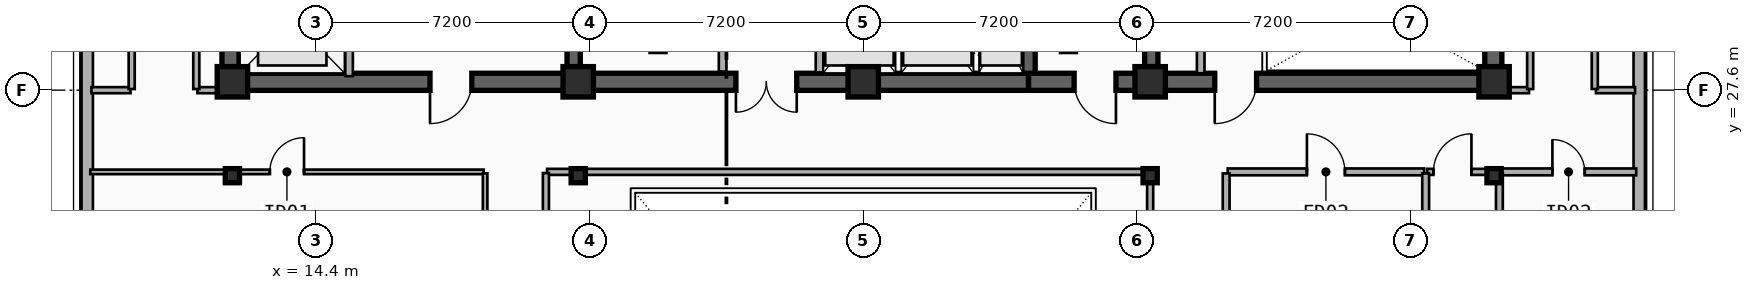
"""IFC4 building model, lengths in metres.
Left out: names, types, materials, properties, quantities, classifications, styles, units other than length and angle.
Written with IfcOpenShell. Run it as: python <this file> out.ifc"""

import sys

from ifc_helpers import new_model, si_unit, direction, frame, frame_2d, origin, origin_2d, place, context, subcontext, project, spatial, rectangle, i_section, extrude, element, fill, save


model = new_model("IFC4")
c1 = context("Model", 3, precision=1e-05, world=origin(), true_north=direction((0.0, 1.0)))
c2 = subcontext(c1, "Body", "Model", "MODEL_VIEW")
j1 = project(units=[si_unit("LENGTHUNIT", "METRE"), si_unit("PLANEANGLEUNIT", "RADIAN")], contexts=[c1])
p1 = place(None, origin())
s1 = spatial("IfcSite", under=j1, at=p1, CompositionType="ELEMENT")
p2 = place(p1, origin())
s2 = spatial("IfcBuilding", under=s1, at=p2, CompositionType="ELEMENT")
p3 = place(p2, frame((0.0, 0.0, 276.9)))
s3 = spatial("IfcBuildingStorey", under=s2, at=p3, CompositionType="ELEMENT", Elevation=276.9)
p4 = place(p3, frame((21.18, 27.82, 0.0), z_axis=(0.0, 0.0, 1.0), x_axis=(-1.0, 0.0, 0.0)))
e1 = element("IfcWall", 1, at=p4, inside=s3, PredefinedType="SHEAR", context=c2, shape_type="SweptSolid", body=[
    extrude(rectangle(XDim=9.03, YDim=0.45, at=frame_2d((4.515, 0.0))), origin(), (0.0, 0.0, 1.0), 3.7),
])
p5 = place(p4, frame((2.68, 0.0, 0.0)))
e2 = element("IfcOpeningElement", 2, at=p5, cuts=e1, PredefinedType="OPENING", context=c2, shape_type="SweptSolid", body=[
    extrude(rectangle(XDim=1.1, YDim=2.15, at=frame_2d((0.55, 1.075))), frame((0.0, 0.235, 0.0), z_axis=(0.0, -1.0, 0.0), x_axis=(1.0, 0.0, 0.0)), (0.0, 0.0, 1.0), 0.47),
])
p6 = place(p3, frame((33.15, 27.82, 0.0), z_axis=(0.0, 0.0, 1.0), x_axis=(-1.0, 0.0, 0.0)))
e3 = element("IfcWall", 3, at=p6, inside=s3, PredefinedType="SHEAR", context=c2, shape_type="SweptSolid", body=[
    extrude(rectangle(XDim=11.97, YDim=0.45, at=frame_2d((5.985, 0.0))), origin(), (0.0, 0.0, 1.0), 3.7),
])
p7 = place(p6, frame((6.1, 0.0, 0.0)))
e4 = element("IfcOpeningElement", 4, at=p7, cuts=e3, PredefinedType="OPENING", context=c2, shape_type="SweptSolid", body=[
    extrude(rectangle(XDim=1.6, YDim=2.2, at=frame_2d((0.8, 1.1))), frame((0.0, 0.235, 0.0), z_axis=(0.0, -1.0, 0.0), x_axis=(1.0, 0.0, 0.0)), (0.0, 0.0, 1.0), 0.47),
])
p8 = place(p3, frame((45.38, 27.82, 0.0), z_axis=(0.0, 0.0, 1.0), x_axis=(-1.0, 0.0, 0.0)))
e5 = element("IfcWall", 5, at=p8, inside=s3, PredefinedType="SHEAR", context=c2, shape_type="SweptSolid", body=[
    extrude(rectangle(XDim=12.23, YDim=0.45, at=frame_2d((6.115, 0.0))), origin(), (0.0, 0.0, 1.0), 3.7),
])
p9 = place(p8, frame((9.93, 0.0, 0.0)))
e6 = element("IfcOpeningElement", 6, at=p9, cuts=e5, PredefinedType="OPENING", context=c2, shape_type="SweptSolid", body=[
    extrude(rectangle(XDim=1.1, YDim=2.15, at=frame_2d((0.55, 1.075))), frame((0.0, 0.235, 0.0), z_axis=(0.0, -1.0, 0.0), x_axis=(1.0, 0.0, 0.0)), (0.0, 0.0, 1.0), 0.47),
])
p10 = place(p8, frame((6.23, 0.0, 0.0)))
e7 = element("IfcOpeningElement", 7, at=p10, cuts=e5, PredefinedType="OPENING", context=c2, shape_type="SweptSolid", body=[
    extrude(rectangle(XDim=1.1, YDim=2.15, at=frame_2d((0.55, 1.075))), frame((0.0, 0.235, 0.0), z_axis=(0.0, -1.0, 0.0), x_axis=(1.0, 0.0, 0.0)), (0.0, 0.0, 1.0), 0.47),
])
for number, where, z_axis, x_axis in (
    (8, (12.15, 28.045, 0.0), (0.0, 0.0, 1.0), (0.0, 1.0, 0.0)),
    (9, (45.38, 28.045, 0.0), (0.0, 0.0, 1.0), (0.0, 1.0, 0.0)),
):
    element("IfcWall", number, at=place(p3, frame(where, z_axis=z_axis, x_axis=x_axis)), inside=s3, PredefinedType="SHEAR", context=c2, shape_type="SweptSolid", body=[
        extrude(rectangle(XDim=8.78, YDim=0.45, at=frame_2d((4.39, 0.0))), origin(), (0.0, 0.0, 1.0), 3.7),
    ])
for number, where, z_axis, x_axis in (
    (10, (21.18, 28.045, 0.0), (0.0, 0.0, 1.0), (0.0, 1.0, 0.0)),
    (11, (33.15, 28.045, 0.0), (0.0, 0.0, 1.0), (0.0, 1.0, 0.0)),
):
    element("IfcWall", number, at=place(p3, frame(where, z_axis=z_axis, x_axis=x_axis)), inside=s3, PredefinedType="SHEAR", context=c2, shape_type="SweptSolid", body=[
        extrude(rectangle(XDim=8.78, YDim=0.35, at=frame_2d((4.39, 0.0))), origin(), (0.0, 0.0, 1.0), 3.7),
    ])
p11 = place(p3, frame((36.38, 28.045, 0.0), z_axis=(0.0, 0.0, 1.0), x_axis=(0.0, 1.0, 0.0)))
e12 = element("IfcWall", 12, at=p11, inside=s3, PredefinedType="SHEAR", context=c2, shape_type="SweptSolid", body=[
    extrude(rectangle(XDim=8.78, YDim=0.35, at=frame_2d((4.39, 0.0))), origin(), (0.0, 0.0, 1.0), 3.7),
])
p12 = place(p11, frame((3.735, 0.0, 0.0)))
e13 = element("IfcOpeningElement", 13, at=p12, cuts=e12, PredefinedType="OPENING", context=c2, shape_type="SweptSolid", body=[
    extrude(rectangle(XDim=1.1, YDim=2.15, at=frame_2d((0.55, 1.075))), frame((0.0, 0.185, 0.0), z_axis=(0.0, -1.0, 0.0), x_axis=(1.0, 0.0, 0.0)), (0.0, 0.0, 1.0), 0.37),
])
for number, where, z_axis, x_axis in (
    (14, (12.2, 27.82, 0.0), (0.0, 0.0, 1.0), (1.0, 0.0, 0.0)),
    (15, (21.3, 27.82, 0.0), (0.0, 0.0, 1.0), (1.0, 0.0, 0.0)),
    (16, (28.8, 27.82, 0.0), (0.0, 0.0, 1.0), (1.0, 0.0, 0.0)),
    (17, (36.35, 27.82, 0.0), (0.0, 0.0, 1.0), (1.0, 0.0, 0.0)),
    (18, (45.4, 27.82, 0.0), (0.0, 0.0, 1.0), (1.0, 0.0, 0.0)),
):
    element("IfcColumn", number, at=place(p3, frame(where, z_axis=z_axis, x_axis=x_axis)), inside=s3, PredefinedType="COLUMN", context=c2, shape_type="SweptSolid", body=[
        extrude(rectangle(XDim=0.8, YDim=0.8, at=origin_2d()), origin(), (0.0, 0.0, 1.0), 3.7),
    ])
for number, where, z_axis, x_axis in (
    (19, (12.2, 25.35, 0.0), (0.0, 0.0, 1.0), (1.0, 0.0, 0.0)),
    (20, (21.3, 25.35, 0.0), (0.0, 0.0, 1.0), (1.0, 0.0, 0.0)),
    (21, (36.35, 25.35, 0.0), (0.0, 0.0, 1.0), (1.0, 0.0, 0.0)),
    (22, (45.4, 25.35, 0.0), (0.0, 0.0, 1.0), (1.0, 0.0, 0.0)),
):
    element("IfcColumn", number, at=place(p3, frame(where, z_axis=z_axis, x_axis=x_axis)), inside=s3, PredefinedType="COLUMN", context=c2, shape_type="SweptSolid", body=[
        extrude(i_section(OverallWidth=0.374, OverallDepth=0.372, WebThickness=0.017, FlangeThickness=0.027, FilletRadius=0.015, at=origin_2d()), origin(), (0.0, 0.0, 1.0), 3.7),
    ])
p13 = place(p3, frame((49.22, 36.8, 0.0), z_axis=(0.0, 0.0, 1.0), x_axis=(0.0, -1.0, 0.0)))
e23 = element("IfcWall", 23, at=p13, inside=s3, PredefinedType="SOLIDWALL", context=c2, shape_type="SweptSolid", body=[
    extrude(rectangle(XDim=34.2, YDim=0.3, at=frame_2d((17.1, 0.0))), origin(), (0.0, 0.0, 1.0), 3.38),
])
p14 = place(p13, frame((21.127, 0.0, 0.75)))
e24 = element("IfcOpeningElement", 24, at=p14, cuts=e23, PredefinedType="OPENING", context=c2, shape_type="SweptSolid", body=[
    extrude(rectangle(XDim=2.1, YDim=2.1, at=frame_2d((1.05, 1.05))), frame((0.0, 0.16, 0.0), z_axis=(0.0, -1.0, 0.0), x_axis=(1.0, 0.0, 0.0)), (0.0, 0.0, 1.0), 0.32),
])
p15 = place(p13, frame((27.503, 0.0, 0.75)))
e25 = element("IfcOpeningElement", 25, at=p15, cuts=e23, PredefinedType="OPENING", context=c2, shape_type="SweptSolid", body=[
    extrude(rectangle(XDim=2.1, YDim=2.1, at=frame_2d((1.05, 1.05))), frame((0.0, 0.16, 0.0), z_axis=(0.0, -1.0, 0.0), x_axis=(1.0, 0.0, 0.0)), (0.0, 0.0, 1.0), 0.32),
])
p16 = place(p3, frame((8.38, 2.6, 0.0), z_axis=(0.0, 0.0, 1.0), x_axis=(0.0, 1.0, 0.0)))
e26 = element("IfcWall", 26, at=p16, inside=s3, PredefinedType="SOLIDWALL", context=c2, shape_type="SweptSolid", body=[
    extrude(rectangle(XDim=34.2, YDim=0.3, at=frame_2d((17.1, 0.0))), origin(), (0.0, 0.0, 1.0), 3.38),
])
p17 = place(p16, frame((6.33, 0.0, 0.75)))
e27 = element("IfcOpeningElement", 27, at=p17, cuts=e26, PredefinedType="OPENING", context=c2, shape_type="SweptSolid", body=[
    extrude(rectangle(XDim=2.1, YDim=2.1, at=frame_2d((1.05, 1.05))), frame((0.0, 0.16, 0.0), z_axis=(0.0, -1.0, 0.0), x_axis=(1.0, 0.0, 0.0)), (0.0, 0.0, 1.0), 0.32),
])
p18 = place(p16, frame((14.44, 0.0, 0.75)))
e28 = element("IfcOpeningElement", 28, at=p18, cuts=e26, PredefinedType="OPENING", context=c2, shape_type="SweptSolid", body=[
    extrude(rectangle(XDim=2.1, YDim=2.1, at=frame_2d((1.05, 1.05))), frame((0.0, 0.16, 0.0), z_axis=(0.0, -1.0, 0.0), x_axis=(1.0, 0.0, 0.0)), (0.0, 0.0, 1.0), 0.32),
])
p19 = place(p3, frame((15.27, 27.97, 0.0), z_axis=(0.0, 0.0, 1.0), x_axis=(0.0, 1.0, 0.0)))
e29 = element("IfcWall", 29, at=p19, inside=s3, PredefinedType="PARTITIONING", context=c2, shape_type="SweptSolid", body=[
    extrude(rectangle(XDim=2.96, YDim=0.2, at=frame_2d((1.48, 0.0))), origin(), (0.0, 0.0, 1.0), 2.45),
])
p20 = place(p19, frame((0.93, 0.0, 0.0)))
e30 = element("IfcOpeningElement", 30, at=p20, cuts=e29, PredefinedType="OPENING", context=c2, shape_type="SweptSolid", body=[
    extrude(rectangle(XDim=1.1, YDim=2.15, at=frame_2d((0.55, 1.075))), frame((0.0, 0.11, 0.0), z_axis=(0.0, -1.0, 0.0), x_axis=(1.0, 0.0, 0.0)), (0.0, 0.0, 1.0), 0.22),
])
p21 = place(p3, frame((27.65, 28.07, 0.0), z_axis=(0.0, 0.0, 1.0), x_axis=(0.0, 1.0, 0.0)))
e31 = element("IfcWall", 31, at=p21, inside=s3, PredefinedType="PARTITIONING", context=c2, shape_type="SweptSolid", body=[
    extrude(rectangle(XDim=2.58, YDim=0.2, at=frame_2d((1.29, 0.0))), origin(), (0.0, 0.0, 1.0), 2.45),
])
p22 = place(p3, frame((37.68, 28.045, 0.0), z_axis=(0.0, 0.0, 1.0), x_axis=(0.0, 1.0, 0.0)))
e32 = element("IfcWall", 32, at=p22, inside=s3, PredefinedType="PARTITIONING", context=c2, shape_type="SweptSolid", body=[
    extrude(rectangle(XDim=3.205, YDim=0.2, at=frame_2d((1.603, 0.0))), origin(), (0.0, 0.0, 1.0), 2.76),
])
p23 = place(p3, frame((25.1, 28.09, 0.0), z_axis=(0.0, 0.0, 1.0), x_axis=(0.0, 1.0, 0.0)))
e33 = element("IfcWall", 33, at=p23, inside=s3, PredefinedType="PARTITIONING", context=c2, shape_type="SweptSolid", body=[
    extrude(rectangle(XDim=1.82, YDim=0.2, at=frame_2d((0.91, 0.0))), origin(), (0.0, 0.0, 1.0), 2.76),
])
p24 = place(p23, frame((0.68, 0.0, 0.0)))
e34 = element("IfcOpeningElement", 34, at=p24, cuts=e33, PredefinedType="OPENING", context=c2, shape_type="SweptSolid", body=[
    extrude(rectangle(XDim=1.0, YDim=2.15, at=frame_2d((0.5, 1.075))), frame((0.0, 0.11, 0.0), z_axis=(0.0, -1.0, 0.0), x_axis=(1.0, 0.0, 0.0)), (0.0, 0.0, 1.0), 0.22),
])
p25 = place(p3, frame((8.46, 25.45, 0.0), z_axis=(0.0, 0.0, 1.0), x_axis=(1.0, 0.0, 0.0)))
e35 = element("IfcWall", 35, at=p25, inside=s3, PredefinedType="PARTITIONING", context=c2, shape_type="SweptSolid", body=[
    extrude(rectangle(XDim=10.35, YDim=0.12, at=frame_2d((5.175, 0.0))), origin(), (0.0, 0.0, 1.0), 2.66),
])
p26 = place(p25, frame((4.725, 0.0, 0.0)))
e36 = element("IfcOpeningElement", 36, at=p26, cuts=e35, PredefinedType="OPENING", context=c2, shape_type="SweptSolid", body=[
    extrude(rectangle(XDim=0.9, YDim=2.1, at=frame_2d((0.45, 1.05))), frame((0.0, 0.07, 0.0), z_axis=(0.0, -1.0, 0.0), x_axis=(1.0, 0.0, 0.0)), (0.0, 0.0, 1.0), 0.14),
])
p27 = place(p3, frame((38.39, 25.45, 0.0), z_axis=(0.0, 0.0, 1.0), x_axis=(1.0, 0.0, 0.0)))
e37 = element("IfcWall", 37, at=p27, inside=s3, PredefinedType="PLUMBINGWALL", context=c2, shape_type="SweptSolid", body=[
    extrude(rectangle(XDim=5.17, YDim=0.18, at=frame_2d((2.585, 0.0))), origin(), (0.0, 0.0, 1.0), 3.38),
])
p28 = place(p27, frame((2.085, 0.0, 0.0)))
e38 = element("IfcOpeningElement", 38, at=p28, cuts=e37, PredefinedType="OPENING", context=c2, shape_type="SweptSolid", body=[
    extrude(rectangle(XDim=1.0, YDim=2.15, at=frame_2d((0.5, 1.075))), frame((0.0, 0.1, 0.0), z_axis=(0.0, -1.0, 0.0), x_axis=(1.0, 0.0, 0.0)), (0.0, 0.0, 1.0), 0.2),
])
p29 = place(p3, frame((43.64, 25.45, 0.0), z_axis=(0.0, 0.0, 1.0), x_axis=(1.0, 0.0, 0.0)))
e39 = element("IfcWall", 39, at=p29, inside=s3, PredefinedType="PARTITIONING", context=c2, shape_type="SweptSolid", body=[
    extrude(rectangle(XDim=1.86, YDim=0.16, at=frame_2d((0.93, 0.0))), origin(), (0.0, 0.0, 1.0), 2.66),
])
p30 = place(p29, frame((0.164, 0.0, 0.0)))
e40 = element("IfcOpeningElement", 40, at=p30, cuts=e39, PredefinedType="OPENING", context=c2, shape_type="SweptSolid", body=[
    extrude(rectangle(XDim=1.0, YDim=2.15, at=frame_2d((0.5, 1.075))), frame((0.0, 0.09, 0.0), z_axis=(0.0, -1.0, 0.0), x_axis=(1.0, 0.0, 0.0)), (0.0, 0.0, 1.0), 0.18),
])
p31 = place(p3, frame((45.58, 25.45, 0.0), z_axis=(0.0, 0.0, 1.0), x_axis=(1.0, 0.0, 0.0)))
e41 = element("IfcWall", 41, at=p31, inside=s3, PredefinedType="PLUMBINGWALL", context=c2, shape_type="SweptSolid", body=[
    extrude(rectangle(XDim=3.56, YDim=0.18, at=frame_2d((1.78, 0.0))), origin(), (0.0, 0.0, 1.0), 2.66),
])
p32 = place(p31, frame((1.355, 0.0, 0.0)))
e42 = element("IfcOpeningElement", 42, at=p32, cuts=e41, PredefinedType="OPENING", context=c2, shape_type="SweptSolid", body=[
    extrude(rectangle(XDim=0.85, YDim=2.1, at=frame_2d((0.425, 1.05))), frame((0.0, 0.1, 0.0), z_axis=(0.0, -1.0, 0.0), x_axis=(1.0, 0.0, 0.0)), (0.0, 0.0, 1.0), 0.2),
])
p33 = place(p3, frame((18.85, 8.89, 0.0), z_axis=(0.0, 0.0, 1.0), x_axis=(0.0, 1.0, 0.0)))
e43 = element("IfcWall", 43, at=p33, inside=s3, PredefinedType="PARTITIONING", context=c2, shape_type="SweptSolid", body=[
    extrude(rectangle(XDim=16.52, YDim=0.12, at=frame_2d((8.26, 0.0))), origin(), (0.0, 0.0, 1.0), 2.86),
])
p34 = place(p33, frame((7.81, 0.0, 0.0)))
e44 = element("IfcOpeningElement", 44, at=p34, cuts=e43, PredefinedType="OPENING", context=c2, shape_type="SweptSolid", body=[
    extrude(rectangle(XDim=0.9, YDim=2.1, at=frame_2d((0.45, 1.05))), frame((0.0, 0.07, 0.0), z_axis=(0.0, -1.0, 0.0), x_axis=(1.0, 0.0, 0.0)), (0.0, 0.0, 1.0), 0.14),
])
p35 = place(p3, frame((38.35, 19.24, 0.0), z_axis=(0.0, 0.0, 1.0), x_axis=(0.0, 1.0, 0.0)))
e45 = element("IfcWall", 45, at=p35, inside=s3, PredefinedType="PLUMBINGWALL", context=c2, shape_type="SweptSolid", body=[
    extrude(rectangle(XDim=6.17, YDim=0.18, at=frame_2d((3.085, 0.0))), origin(), (0.0, 0.0, 1.0), 3.01),
])
p36 = place(p35, frame((2.585, 0.0, 0.0)))
e46 = element("IfcOpeningElement", 46, at=p36, cuts=e45, PredefinedType="OPENING", context=c2, shape_type="SweptSolid", body=[
    extrude(rectangle(XDim=1.0, YDim=2.15, at=frame_2d((0.5, 1.075))), frame((0.0, 0.1, 0.0), z_axis=(0.0, -1.0, 0.0), x_axis=(1.0, 0.0, 0.0)), (0.0, 0.0, 1.0), 0.2),
])
p37 = place(p3, frame((43.6, 19.24, 0.0), z_axis=(0.0, 0.0, 1.0), x_axis=(0.0, 1.0, 0.0)))
e47 = element("IfcWall", 47, at=p37, inside=s3, PredefinedType="PLUMBINGWALL", context=c2, shape_type="SweptSolid", body=[
    extrude(rectangle(XDim=6.17, YDim=0.18, at=frame_2d((3.085, 0.0))), origin(), (0.0, 0.0, 1.0), 3.01),
])
p38 = place(p3, frame((45.54, 20.29, 0.0), z_axis=(0.0, 0.0, 1.0), x_axis=(0.0, 1.0, 0.0)))
e48 = element("IfcWall", 48, at=p38, inside=s3, PredefinedType="PLUMBINGWALL", context=c2, shape_type="SweptSolid", body=[
    extrude(rectangle(XDim=5.12, YDim=0.18, at=frame_2d((2.56, 0.0))), origin(), (0.0, 0.0, 1.0), 2.66),
])
p39 = place(p3, frame((20.48, 25.45, 0.0), z_axis=(0.0, 0.0, 1.0), x_axis=(1.0, 0.0, 0.0)))
e49 = element("IfcWall", 49, at=p39, inside=s3, PredefinedType="PARTITIONING", context=c2, shape_type="SweptSolid", body=[
    extrude(rectangle(XDim=15.84, YDim=0.16, at=frame_2d((7.92, 0.0))), origin(), (0.0, 0.0, 1.0), 2.66),
])
p40 = place(p3, frame((8.49, 27.6, 0.0), z_axis=(0.0, 0.0, 1.0), x_axis=(1.0, 0.0, 0.0)))
e50 = element("IfcWall", 50, at=p40, inside=s3, PredefinedType="PARTITIONING", context=c2, shape_type="SweptSolid", body=[
    extrude(rectangle(XDim=1.03, YDim=0.16, at=frame_2d((0.515, 0.0))), origin(), (0.0, 0.0, 1.0), 3.38),
])
p41 = place(p3, frame((11.28, 27.6, 0.0), z_axis=(0.0, 0.0, 1.0), x_axis=(1.0, 0.0, 0.0)))
e51 = element("IfcWall", 51, at=p41, inside=s3, PredefinedType="PARTITIONING", context=c2, shape_type="SweptSolid", body=[
    extrude(rectangle(XDim=0.84, YDim=0.16, at=frame_2d((0.42, 0.0))), origin(), (0.0, 0.0, 1.0), 2.45),
])
p42 = place(p3, frame((45.41, 27.6, 0.0), z_axis=(0.0, 0.0, 1.0), x_axis=(1.0, 0.0, 0.0)))
e52 = element("IfcWall", 52, at=p42, inside=s3, PredefinedType="PARTITIONING", context=c2, shape_type="SweptSolid", body=[
    extrude(rectangle(XDim=0.91, YDim=0.16, at=frame_2d((0.455, 0.0))), origin(), (0.0, 0.0, 1.0), 2.45),
])
p43 = place(p3, frame((48.08, 27.6, 0.0), z_axis=(0.0, 0.0, 1.0), x_axis=(1.0, 0.0, 0.0)))
e53 = element("IfcWall", 53, at=p43, inside=s3, PredefinedType="PARTITIONING", context=c2, shape_type="SweptSolid", body=[
    extrude(rectangle(XDim=1.03, YDim=0.16, at=frame_2d((0.515, 0.0))), origin(), (0.0, 0.0, 1.0), 3.38),
])
p44 = place(p3, frame((20.45, 10.43, 0.0), z_axis=(0.0, 0.0, 1.0), x_axis=(0.0, 1.0, 0.0)))
e54 = element("IfcWall", 54, at=p44, inside=s3, PredefinedType="PARTITIONING", context=c2, shape_type="SweptSolid", body=[
    extrude(rectangle(XDim=14.99, YDim=0.16, at=frame_2d((7.495, 0.0))), origin(), (0.0, 0.0, 1.0), 2.86),
])
p45 = place(p3, frame((36.35, 10.43, 0.0), z_axis=(0.0, 0.0, 1.0), x_axis=(0.0, 1.0, 0.0)))
e55 = element("IfcWall", 55, at=p45, inside=s3, PredefinedType="PARTITIONING", context=c2, shape_type="SweptSolid", body=[
    extrude(rectangle(XDim=14.99, YDim=0.16, at=frame_2d((7.495, 0.0))), origin(), (0.0, 0.0, 1.0), 2.66),
])
for number, where, z_axis, x_axis in (
    (56, (9.55, 27.63, 0.0), (0.0, 0.0, 1.0), (0.0, 1.0, 0.0)),
    (57, (11.25, 27.63, 0.0), (0.0, 0.0, 1.0), (0.0, 1.0, 0.0)),
    (58, (46.35, 27.63, 0.0), (0.0, 0.0, 1.0), (0.0, 1.0, 0.0)),
    (59, (48.05, 27.63, 0.0), (0.0, 0.0, 1.0), (0.0, 1.0, 0.0)),
):
    element("IfcWall", number, at=place(p3, frame(where, z_axis=z_axis, x_axis=x_axis)), inside=s3, PredefinedType="PARTITIONING", context=c2, shape_type="SweptSolid", body=[
        extrude(rectangle(XDim=10.24, YDim=0.16, at=frame_2d((5.12, 0.0))), origin(), (0.0, 0.0, 1.0), 2.86),
    ])
p46 = place(p5, origin())
e60 = element("IfcDoor", 60, at=p46, inside=s3, OperationType="SINGLE_SWING_RIGHT", PredefinedType="DOOR", context=c2, shape_type="SweptSolid", body=[
    extrude(rectangle(XDim=1.1, YDim=2.15, at=frame_2d((0.55, 1.075))), frame((0.0, 0.025, 0.0), z_axis=(0.0, -1.0, 0.0), x_axis=(1.0, 0.0, 0.0)), (0.0, 0.0, 1.0), 0.05),
])
fill(e2, e60)
p47 = place(p9, origin())
e61 = element("IfcDoor", 61, at=p47, inside=s3, OperationType="SINGLE_SWING_LEFT", PredefinedType="DOOR", context=c2, shape_type="SweptSolid", body=[
    extrude(rectangle(XDim=1.1, YDim=2.15, at=frame_2d((0.55, 1.075))), frame((0.0, 0.025, 0.0), z_axis=(0.0, -1.0, 0.0), x_axis=(1.0, 0.0, 0.0)), (0.0, 0.0, 1.0), 0.05),
])
fill(e6, e61)
p48 = place(p10, origin())
e62 = element("IfcDoor", 62, at=p48, inside=s3, OperationType="SINGLE_SWING_RIGHT", PredefinedType="DOOR", context=c2, shape_type="SweptSolid", body=[
    extrude(rectangle(XDim=1.1, YDim=2.15, at=frame_2d((0.55, 1.075))), frame((0.0, 0.025, 0.0), z_axis=(0.0, -1.0, 0.0), x_axis=(1.0, 0.0, 0.0)), (0.0, 0.0, 1.0), 0.05),
])
fill(e7, e62)
p49 = place(p7, origin())
e63 = element("IfcDoor", 63, at=p49, inside=s3, OperationType="SINGLE_SWING_LEFT", PredefinedType="DOOR", context=c2, shape_type="SweptSolid", body=[
    extrude(rectangle(XDim=1.6, YDim=2.2, at=frame_2d((0.8, 1.1))), frame((0.0, 0.025, 0.0), z_axis=(0.0, -1.0, 0.0), x_axis=(1.0, 0.0, 0.0)), (0.0, 0.0, 1.0), 0.05),
])
fill(e4, e63)
p50 = place(p26, origin())
e64 = element("IfcDoor", 64, at=p50, inside=s3, OperationType="SINGLE_SWING_RIGHT", PredefinedType="DOOR", context=c2, shape_type="SweptSolid", body=[
    extrude(rectangle(XDim=0.9, YDim=2.1, at=frame_2d((0.45, 1.05))), frame((0.0, 0.025, 0.0), z_axis=(0.0, -1.0, 0.0), x_axis=(1.0, 0.0, 0.0)), (0.0, 0.0, 1.0), 0.05),
])
fill(e36, e64)
p51 = place(p28, origin())
e65 = element("IfcDoor", 65, at=p51, inside=s3, OperationType="SINGLE_SWING_LEFT", PredefinedType="DOOR", context=c2, shape_type="SweptSolid", body=[
    extrude(rectangle(XDim=1.0, YDim=2.15, at=frame_2d((0.5, 1.075))), frame((0.0, 0.025, 0.0), z_axis=(0.0, -1.0, 0.0), x_axis=(1.0, 0.0, 0.0)), (0.0, 0.0, 1.0), 0.05),
])
fill(e38, e65)
p52 = place(p30, origin())
e66 = element("IfcDoor", 66, at=p52, inside=s3, OperationType="SINGLE_SWING_RIGHT", PredefinedType="DOOR", context=c2, shape_type="SweptSolid", body=[
    extrude(rectangle(XDim=1.0, YDim=2.15, at=frame_2d((0.5, 1.075))), frame((0.0, 0.025, 0.0), z_axis=(0.0, -1.0, 0.0), x_axis=(1.0, 0.0, 0.0)), (0.0, 0.0, 1.0), 0.05),
])
fill(e40, e66)
p53 = place(p32, origin())
e67 = element("IfcDoor", 67, at=p53, inside=s3, OperationType="SINGLE_SWING_LEFT", PredefinedType="DOOR", context=c2, shape_type="SweptSolid", body=[
    extrude(rectangle(XDim=0.85, YDim=2.1, at=frame_2d((0.425, 1.05))), frame((0.0, 0.025, 0.0), z_axis=(0.0, -1.0, 0.0), x_axis=(1.0, 0.0, 0.0)), (0.0, 0.0, 1.0), 0.05),
])
fill(e42, e67)
save(model, sys.argv[1])
